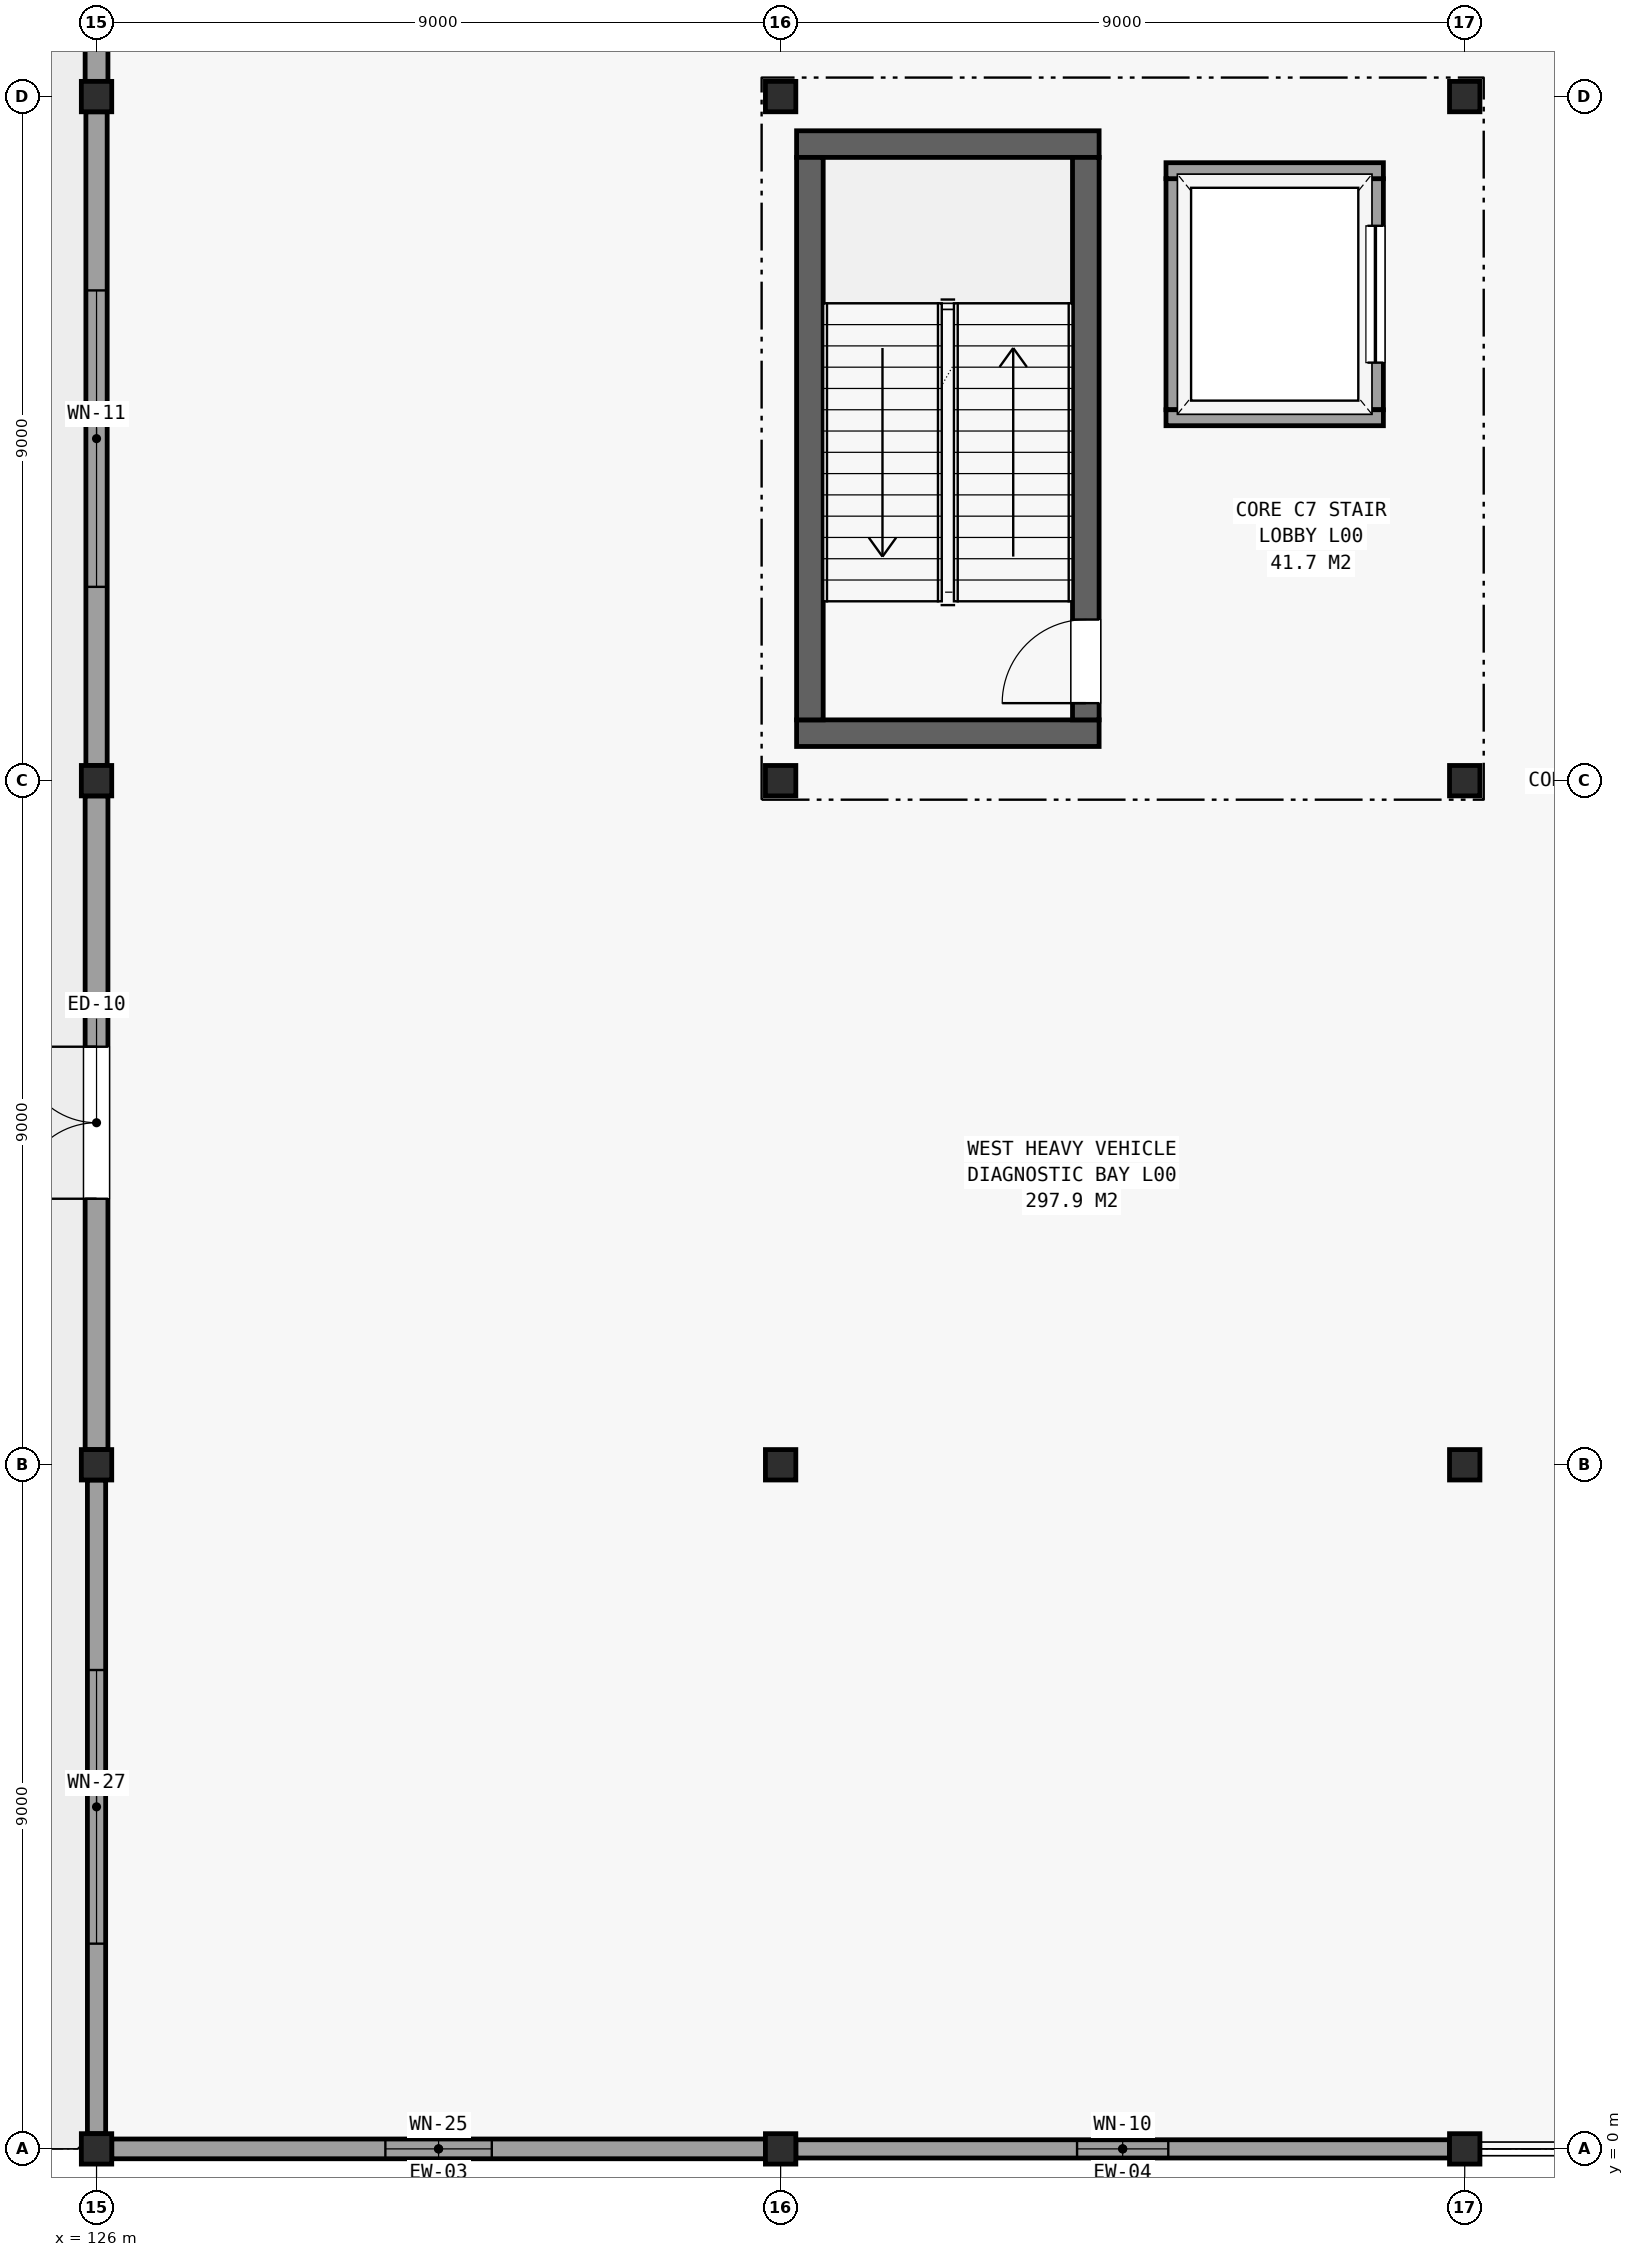
"""IFC4 building model, lengths in metres.
Left out: names, types, materials, properties, quantities, classifications, styles, units other than length and angle.
Written with IfcOpenShell. Run it as: python <this file> out.ifc"""

import sys

from ifc_helpers import new_model, si_unit, direction, frame, frame_2d, origin, origin_2d, place, context, subcontext, project, spatial, rectangle, hollow_rectangle, extrude, element, fill, save


model = new_model("IFC4")
c1 = context("Model", 3, precision=1e-05, world=origin(), true_north=direction((0.0, 1.0)))
c2 = subcontext(c1, "Body", "Model", "MODEL_VIEW")
j1 = project(units=[si_unit("LENGTHUNIT", "METRE"), si_unit("PLANEANGLEUNIT", "RADIAN")], contexts=[c1])
p1 = place(None, origin())
s1 = spatial("IfcSite", under=j1, at=p1, CompositionType="ELEMENT")
p2 = place(p1, origin())
s2 = spatial("IfcBuilding", under=s1, at=p2, CompositionType="ELEMENT")
p3 = place(p2, origin())
s3 = spatial("IfcBuildingStorey", under=s2, at=p3, CompositionType="ELEMENT", Elevation=0.0)
for number, where, z_axis, x_axis in (
    (1, (126.0, 0.0, 0.0), (0.0, 0.0, 1.0), (1.0, 0.0, 0.0)),
    (2, (126.0, 9.0, 0.0), (0.0, 0.0, 1.0), (1.0, 0.0, 0.0)),
    (3, (126.0, 18.0, 0.0), (0.0, 0.0, 1.0), (1.0, 0.0, 0.0)),
    (4, (126.0, 27.0, 0.0), (0.0, 0.0, 1.0), (1.0, 0.0, 0.0)),
):
    element("IfcColumn", number, at=place(p3, frame(where, z_axis=z_axis, x_axis=x_axis)), inside=s3, PredefinedType="COLUMN", context=c2, shape_type="SweptSolid", body=[
        extrude(hollow_rectangle(XDim=0.4, YDim=0.4, WallThickness=0.019, at=origin_2d()), origin(), (0.0, 0.0, 1.0), 5.04),
    ])
for number, where, z_axis, x_axis in (
    (5, (135.0, 0.0, 0.0), (0.0, 0.0, 1.0), (1.0, 0.0, 0.0)),
    (6, (135.0, 9.0, 0.0), (0.0, 0.0, 1.0), (1.0, 0.0, 0.0)),
    (7, (135.0, 18.0, 0.0), (0.0, 0.0, 1.0), (1.0, 0.0, 0.0)),
    (8, (135.0, 27.0, 0.0), (0.0, 0.0, 1.0), (1.0, 0.0, 0.0)),
    (9, (144.0, 0.0, 0.0), (0.0, 0.0, 1.0), (1.0, 0.0, 0.0)),
    (10, (144.0, 9.0, 0.0), (0.0, 0.0, 1.0), (1.0, 0.0, 0.0)),
    (11, (144.0, 18.0, 0.0), (0.0, 0.0, 1.0), (1.0, 0.0, 0.0)),
    (12, (144.0, 27.0, 0.0), (0.0, 0.0, 1.0), (1.0, 0.0, 0.0)),
):
    element("IfcColumn", number, at=place(p3, frame(where, z_axis=z_axis, x_axis=x_axis)), inside=s3, PredefinedType="COLUMN", context=c2, shape_type="SweptSolid", body=[
        extrude(hollow_rectangle(XDim=0.4, YDim=0.4, WallThickness=0.019, at=origin_2d()), origin(), (0.0, 0.0, 1.0), 5.1),
    ])
p4 = place(p3, frame((126.2, 0.0, 0.0), z_axis=(0.0, 0.0, 1.0), x_axis=(1.0, 0.0, 0.0)))
e13 = element("IfcWall", 13, at=p4, inside=s3, PredefinedType="SOLIDWALL", context=c2, shape_type="SweptSolid", body=[
    extrude(rectangle(XDim=8.6, YDim=0.26, at=frame_2d((4.3, 0.0))), origin(), (0.0, 0.0, 1.0), 4.19),
])
p5 = place(p4, frame((3.6, 0.0, 0.95)))
e14 = element("IfcOpeningElement", 14, at=p5, cuts=e13, PredefinedType="OPENING", context=c2, shape_type="SweptSolid", body=[
    extrude(rectangle(XDim=1.4, YDim=2.0, at=frame_2d((0.7, 1.0))), frame((0.0, 0.141, 0.0), z_axis=(0.0, -1.0, 0.0), x_axis=(1.0, 0.0, 0.0)), (0.0, 0.0, 1.0), 0.282),
])
p6 = place(p3, frame((135.2, 0.0, 0.0), z_axis=(0.0, 0.0, 1.0), x_axis=(1.0, 0.0, 0.0)))
e15 = element("IfcWall", 15, at=p6, inside=s3, PredefinedType="SOLIDWALL", context=c2, shape_type="SweptSolid", body=[
    extrude(rectangle(XDim=8.6, YDim=0.24, at=frame_2d((4.3, 0.0))), origin(), (0.0, 0.0, 1.0), 4.19),
])
p7 = place(p6, frame((3.7, 0.0, 0.95)))
e16 = element("IfcOpeningElement", 16, at=p7, cuts=e15, PredefinedType="OPENING", context=c2, shape_type="SweptSolid", body=[
    extrude(rectangle(XDim=1.2, YDim=1.8, at=frame_2d((0.6, 0.9))), frame((0.0, 0.131, 0.0), z_axis=(0.0, -1.0, 0.0), x_axis=(1.0, 0.0, 0.0)), (0.0, 0.0, 1.0), 0.262),
])
p8 = place(p3, frame((126.0, 35.8, 0.0), z_axis=(0.0, 0.0, 1.0), x_axis=(0.0, -1.0, 0.0)))
e17 = element("IfcWall", 17, at=p8, inside=s3, PredefinedType="SOLIDWALL", context=c2, shape_type="SweptSolid", body=[
    extrude(rectangle(XDim=8.6, YDim=0.3, at=frame_2d((4.3, 0.0))), origin(), (0.0, 0.0, 1.0), 4.45),
])
p9 = place(p8, frame((5.25, 0.0, 0.0), z_axis=(0.0, 0.0, 1.0), x_axis=(-1.0, 0.0, 0.0)))
e18 = element("IfcOpeningElement", 18, at=p9, cuts=e17, PredefinedType="OPENING", context=c2, shape_type="SweptSolid", body=[
    extrude(rectangle(XDim=1.9, YDim=2.4, at=frame_2d((0.95, 1.2))), frame((0.0, 0.161, 0.0), z_axis=(0.0, -1.0, 0.0), x_axis=(1.0, 0.0, 0.0)), (0.0, 0.0, 1.0), 0.322),
])
p10 = place(p3, frame((126.0, 26.8, 0.0), z_axis=(0.0, 0.0, 1.0), x_axis=(0.0, -1.0, 0.0)))
e19 = element("IfcWall", 19, at=p10, inside=s3, PredefinedType="SOLIDWALL", context=c2, shape_type="SweptSolid", body=[
    extrude(rectangle(XDim=8.6, YDim=0.28, at=frame_2d((4.3, 0.0))), origin(), (0.0, 0.0, 1.0), 4.45),
])
p11 = place(p10, frame((2.35, 0.0, 0.95)))
e20 = element("IfcOpeningElement", 20, at=p11, cuts=e19, PredefinedType="OPENING", context=c2, shape_type="SweptSolid", body=[
    extrude(rectangle(XDim=3.9, YDim=1.5, at=frame_2d((1.95, 0.75))), frame((0.0, 0.151, 0.0), z_axis=(0.0, -1.0, 0.0), x_axis=(1.0, 0.0, 0.0)), (0.0, 0.0, 1.0), 0.302),
])
p12 = place(p3, frame((126.0, 17.8, 0.0), z_axis=(0.0, 0.0, 1.0), x_axis=(0.0, -1.0, 0.0)))
e21 = element("IfcWall", 21, at=p12, inside=s3, PredefinedType="SOLIDWALL", context=c2, shape_type="SweptSolid", body=[
    extrude(rectangle(XDim=8.6, YDim=0.3, at=frame_2d((4.3, 0.0))), origin(), (0.0, 0.0, 1.0), 4.45),
])
p13 = place(p12, frame((5.3, 0.0, 0.0), z_axis=(0.0, 0.0, 1.0), x_axis=(-1.0, 0.0, 0.0)))
e22 = element("IfcOpeningElement", 22, at=p13, cuts=e21, PredefinedType="OPENING", context=c2, shape_type="SweptSolid", body=[
    extrude(rectangle(XDim=2.0, YDim=2.5, at=frame_2d((1.0, 1.25))), frame((0.0, 0.161, 0.0), z_axis=(0.0, -1.0, 0.0), x_axis=(1.0, 0.0, 0.0)), (0.0, 0.0, 1.0), 0.322),
])
p14 = place(p3, frame((126.0, 8.8, 0.0), z_axis=(0.0, 0.0, 1.0), x_axis=(0.0, -1.0, 0.0)))
e23 = element("IfcWall", 23, at=p14, inside=s3, PredefinedType="SOLIDWALL", context=c2, shape_type="SweptSolid", body=[
    extrude(rectangle(XDim=8.6, YDim=0.24, at=frame_2d((4.3, 0.0))), origin(), (0.0, 0.0, 1.0), 4.45),
])
p15 = place(p14, frame((2.5, 0.0, 0.95)))
e24 = element("IfcOpeningElement", 24, at=p15, cuts=e23, PredefinedType="OPENING", context=c2, shape_type="SweptSolid", body=[
    extrude(rectangle(XDim=3.6, YDim=1.5, at=frame_2d((1.8, 0.75))), frame((0.0, 0.131, 0.0), z_axis=(0.0, -1.0, 0.0), x_axis=(1.0, 0.0, 0.0)), (0.0, 0.0, 1.0), 0.262),
])
for number, where, z_axis, x_axis in (
    (25, (135.21, 18.625, 0.0), (0.0, 0.0, 1.0), (1.0, 0.0, 0.0)),
    (26, (135.21, 26.375, 0.0), (0.0, 0.0, 1.0), (1.0, 0.0, 0.0)),
):
    element("IfcWall", number, at=place(p3, frame(where, z_axis=z_axis, x_axis=x_axis)), inside=s3, PredefinedType="SHEAR", context=c2, shape_type="SweptSolid", body=[
        extrude(rectangle(XDim=3.98, YDim=0.35, at=frame_2d((1.99, 0.0))), origin(), (0.0, 0.0, 1.0), 4.84),
    ])
p16 = place(p3, frame((135.385, 18.8, 0.0), z_axis=(0.0, 0.0, 1.0), x_axis=(0.0, 1.0, 0.0)))
e27 = element("IfcWall", 27, at=p16, inside=s3, PredefinedType="SHEAR", context=c2, shape_type="SweptSolid", body=[
    extrude(rectangle(XDim=7.4, YDim=0.35, at=frame_2d((3.7, 0.0))), origin(), (0.0, 0.0, 1.0), 4.84),
])
p17 = place(p3, frame((139.015, 18.8, 0.0), z_axis=(0.0, 0.0, 1.0), x_axis=(0.0, 1.0, 0.0)))
e28 = element("IfcWall", 28, at=p17, inside=s3, PredefinedType="SHEAR", context=c2, shape_type="SweptSolid", body=[
    extrude(rectangle(XDim=7.4, YDim=0.35, at=frame_2d((3.7, 0.0))), origin(), (0.0, 0.0, 1.0), 4.84),
])
p18 = place(p17, frame((0.22, 0.0, 0.0)))
e29 = element("IfcOpeningElement", 29, at=p18, cuts=e28, PredefinedType="OPENING", context=c2, shape_type="SweptSolid", body=[
    extrude(rectangle(XDim=1.1, YDim=2.15, at=frame_2d((0.55, 1.075))), frame((0.0, 0.186, 0.0), z_axis=(0.0, -1.0, 0.0), x_axis=(1.0, 0.0, 0.0)), (0.0, 0.0, 1.0), 0.372),
])
p19 = place(p3, frame((142.825, 22.88, 0.0), z_axis=(0.0, 0.0, 1.0), x_axis=(0.0, 1.0, 0.0)))
e30 = element("IfcWall", 30, at=p19, inside=s3, PredefinedType="PARTITIONING", context=c2, shape_type="SweptSolid", body=[
    extrude(rectangle(XDim=3.04, YDim=0.21, at=frame_2d((1.52, 0.0))), origin(), (0.0, 0.0, 1.0), 4.84),
])
p20 = place(p19, frame((0.62, 0.0, 0.0)))
e31 = element("IfcOpeningElement", 31, at=p20, cuts=e30, PredefinedType="OPENING", context=c2, shape_type="SweptSolid", body=[
    extrude(rectangle(XDim=1.8, YDim=2.4, at=frame_2d((0.9, 1.2))), frame((0.0, 0.116, 0.0), z_axis=(0.0, -1.0, 0.0), x_axis=(1.0, 0.0, 0.0)), (0.0, 0.0, 1.0), 0.232),
])
p21 = place(p3, frame((140.175, 22.88, 0.0), z_axis=(0.0, 0.0, 1.0), x_axis=(0.0, 1.0, 0.0)))
e32 = element("IfcWall", 32, at=p21, inside=s3, PredefinedType="PARTITIONING", context=c2, shape_type="SweptSolid", body=[
    extrude(rectangle(XDim=3.04, YDim=0.21, at=frame_2d((1.52, 0.0))), origin(), (0.0, 0.0, 1.0), 4.84),
])
for number, where, z_axis, x_axis in (
    (33, (140.07, 22.775, 0.0), (0.0, 0.0, 1.0), (1.0, 0.0, 0.0)),
    (34, (140.07, 26.025, 0.0), (0.0, 0.0, 1.0), (1.0, 0.0, 0.0)),
):
    element("IfcWall", number, at=place(p3, frame(where, z_axis=z_axis, x_axis=x_axis)), inside=s3, PredefinedType="PARTITIONING", context=c2, shape_type="SweptSolid", body=[
        extrude(rectangle(XDim=2.86, YDim=0.21, at=frame_2d((1.43, 0.0))), origin(), (0.0, 0.0, 1.0), 4.84),
    ])
p22 = place(p5, origin())
e35 = element("IfcWindow", 35, at=p22, inside=s3, PartitioningType="SINGLE_PANEL", PredefinedType="WINDOW", context=c2, shape_type="SweptSolid", body=[
    extrude(rectangle(XDim=1.4, YDim=2.0, at=frame_2d((0.7, 1.0))), frame((0.0, 0.03, 0.0), z_axis=(0.0, -1.0, 0.0), x_axis=(1.0, 0.0, 0.0)), (0.0, 0.0, 1.0), 0.06),
])
fill(e14, e35)
p23 = place(p7, origin())
e36 = element("IfcWindow", 36, at=p23, inside=s3, PartitioningType="SINGLE_PANEL", PredefinedType="WINDOW", context=c2, shape_type="SweptSolid", body=[
    extrude(rectangle(XDim=1.2, YDim=1.8, at=frame_2d((0.6, 0.9))), frame((0.0, 0.03, 0.0), z_axis=(0.0, -1.0, 0.0), x_axis=(1.0, 0.0, 0.0)), (0.0, 0.0, 1.0), 0.06),
])
fill(e16, e36)
p24 = place(p11, origin())
e37 = element("IfcWindow", 37, at=p24, inside=s3, PartitioningType="SINGLE_PANEL", PredefinedType="WINDOW", context=c2, shape_type="SweptSolid", body=[
    extrude(rectangle(XDim=3.9, YDim=1.5, at=frame_2d((1.95, 0.75))), frame((0.0, 0.03, 0.0), z_axis=(0.0, -1.0, 0.0), x_axis=(1.0, 0.0, 0.0)), (0.0, 0.0, 1.0), 0.06),
])
fill(e20, e37)
p25 = place(p13, origin())
e38 = element("IfcDoor", 38, at=p25, inside=s3, OperationType="SINGLE_SWING_LEFT", PredefinedType="DOOR", context=c2, shape_type="SweptSolid", body=[
    extrude(rectangle(XDim=2.0, YDim=2.5, at=frame_2d((1.0, 1.25))), frame((0.0, 0.025, 0.0), z_axis=(0.0, -1.0, 0.0), x_axis=(1.0, 0.0, 0.0)), (0.0, 0.0, 1.0), 0.05),
])
fill(e22, e38)
p26 = place(p15, origin())
e39 = element("IfcWindow", 39, at=p26, inside=s3, PartitioningType="SINGLE_PANEL", PredefinedType="WINDOW", context=c2, shape_type="SweptSolid", body=[
    extrude(rectangle(XDim=3.6, YDim=1.5, at=frame_2d((1.8, 0.75))), frame((0.0, 0.03, 0.0), z_axis=(0.0, -1.0, 0.0), x_axis=(1.0, 0.0, 0.0)), (0.0, 0.0, 1.0), 0.06),
])
fill(e24, e39)
p27 = place(p18, origin())
e40 = element("IfcDoor", 40, at=p27, inside=s3, OperationType="SINGLE_SWING_LEFT", PredefinedType="DOOR", context=c2, shape_type="SweptSolid", body=[
    extrude(rectangle(XDim=1.1, YDim=2.15, at=frame_2d((0.55, 1.075))), frame((0.0, 0.025, 0.0), z_axis=(0.0, -1.0, 0.0), x_axis=(1.0, 0.0, 0.0)), (0.0, 0.0, 1.0), 0.05),
])
fill(e29, e40)
p28 = place(p20, origin())
e41 = element("IfcDoor", 41, at=p28, inside=s3, OperationType="SLIDING_TO_LEFT", PredefinedType="DOOR", context=c2, shape_type="SweptSolid", body=[
    extrude(rectangle(XDim=1.8, YDim=2.4, at=frame_2d((0.9, 1.2))), frame((0.0, 0.025, 0.0), z_axis=(0.0, -1.0, 0.0), x_axis=(1.0, 0.0, 0.0)), (0.0, 0.0, 1.0), 0.05),
])
fill(e31, e41)
save(model, sys.argv[1])
